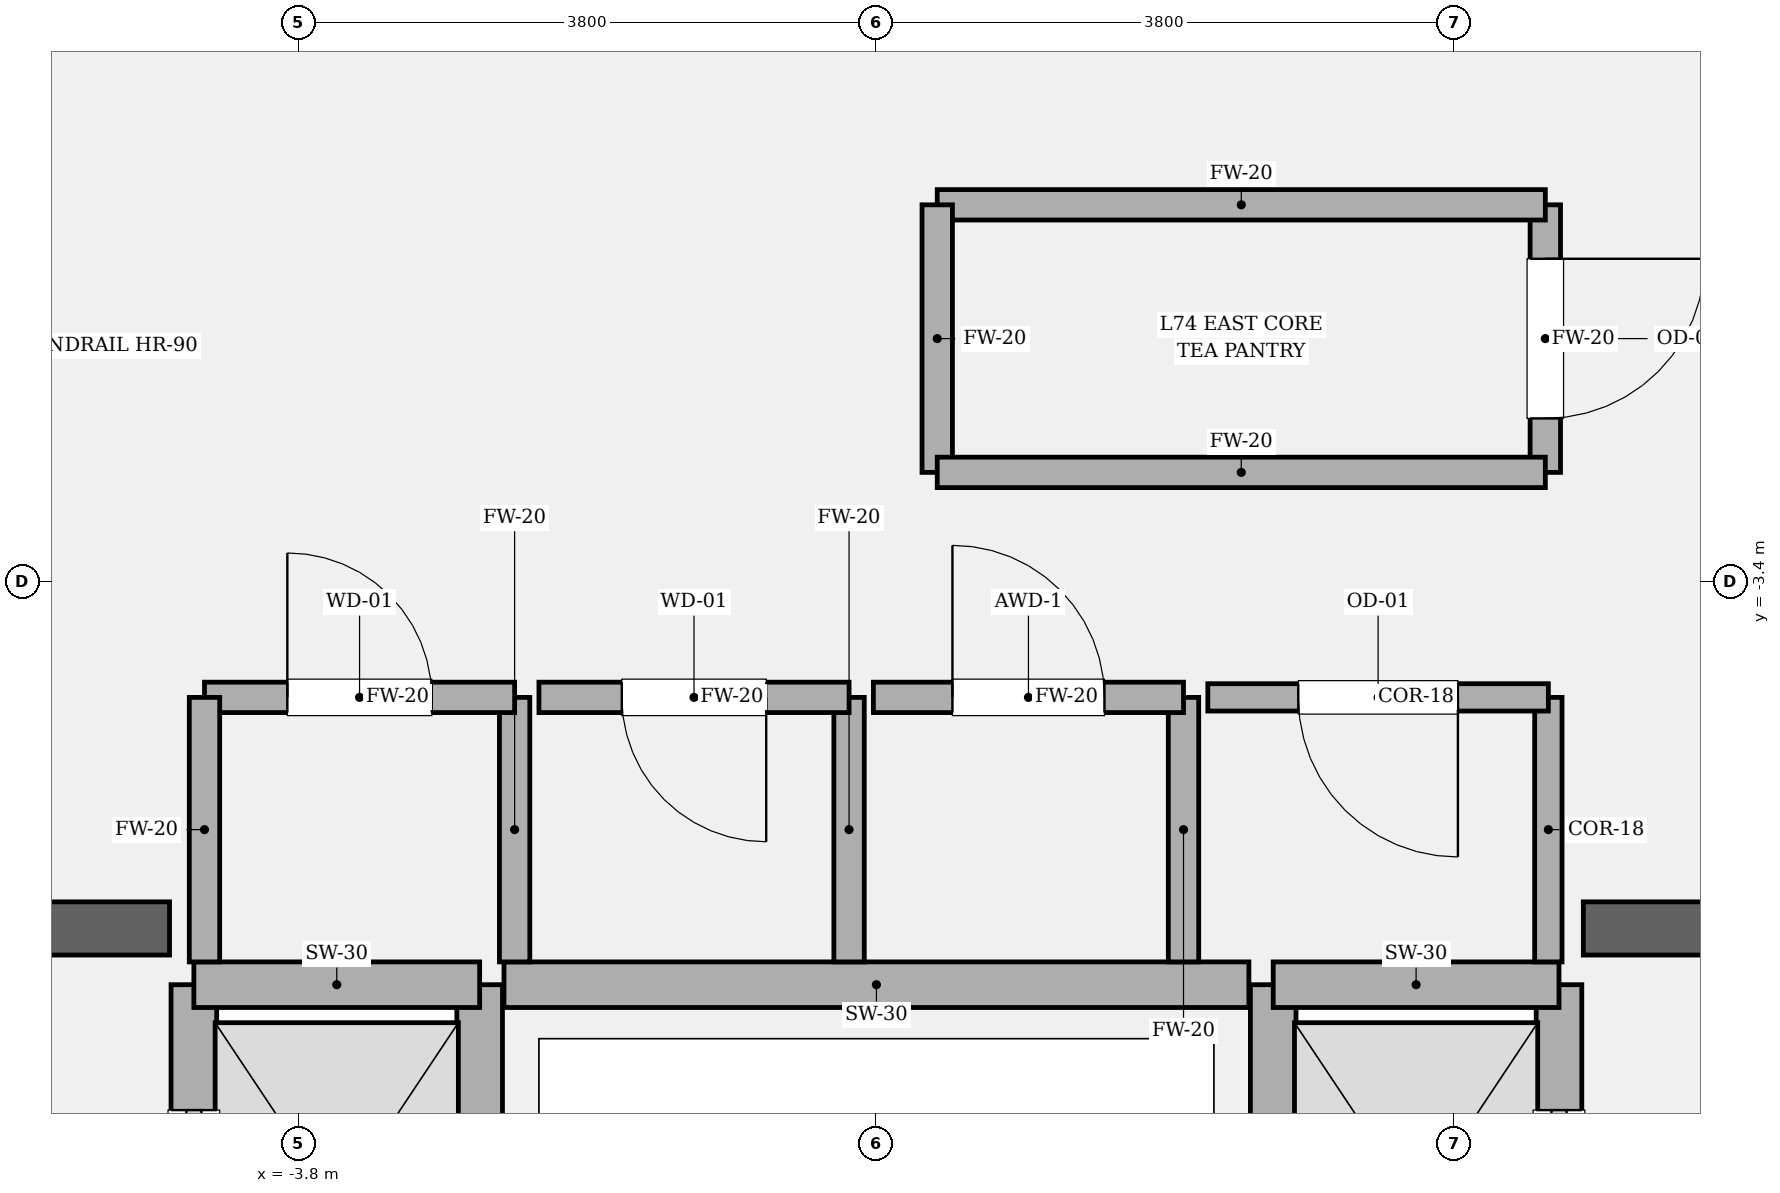
"""IFC4 building model, lengths in metres.
Left out: names, types, materials, properties, quantities, classifications, styles, units other than length and angle.
Written with IfcOpenShell. Run it as: python <this file> out.ifc"""

import sys

from ifc_helpers import new_model, si_unit, direction, frame, frame_2d, origin, place, context, subcontext, project, spatial, rectangle, extrude, element, fill, save


model = new_model("IFC4")
c1 = context("Model", 3, precision=1e-05, world=origin(), true_north=direction((0.0, 1.0)))
c2 = subcontext(c1, "Body", "Model", "MODEL_VIEW")
j1 = project(units=[si_unit("LENGTHUNIT", "METRE"), si_unit("PLANEANGLEUNIT", "RADIAN")], contexts=[c1])
p1 = place(None, origin())
s1 = spatial("IfcSite", under=j1, at=p1, CompositionType="ELEMENT")
p2 = place(p1, origin())
s2 = spatial("IfcBuilding", under=s1, at=p2, CompositionType="ELEMENT")
p3 = place(p2, frame((0.0, 0.0, 313.2)))
s3 = spatial("IfcBuildingStorey", under=s2, at=p3, CompositionType="ELEMENT", Elevation=313.2)
p4 = place(p3, frame((-9.925, -5.68, 0.0), z_axis=(0.0, 0.0, 1.0), x_axis=(1.0, 0.0, 0.0)))
e1 = element("IfcWall", 1, at=p4, inside=s3, PredefinedType="SOLIDWALL", context=c2, shape_type="SweptSolid", body=[
    extrude(rectangle(XDim=5.275, YDim=0.35, at=frame_2d((2.638, 0.0))), origin(), (0.0, 0.0, 1.0), 4.2),
])
p5 = place(p4, frame((1.385, 0.0, 0.0)))
e2 = element("IfcOpeningElement", 2, at=p5, cuts=e1, PredefinedType="OPENING", context=c2, shape_type="SweptSolid", body=[
    extrude(rectangle(XDim=1.18, YDim=2.2, at=frame_2d((0.59, 1.1))), frame((0.0, 0.185, 0.0), z_axis=(0.0, -1.0, 0.0), x_axis=(1.0, 0.0, 0.0)), (0.0, 0.0, 1.0), 0.37),
])
p6 = place(p3, frame((4.65, -5.68, 0.0), z_axis=(0.0, 0.0, 1.0), x_axis=(1.0, 0.0, 0.0)))
e3 = element("IfcWall", 3, at=p6, inside=s3, PredefinedType="SOLIDWALL", context=c2, shape_type="SweptSolid", body=[
    extrude(rectangle(XDim=5.275, YDim=0.35, at=frame_2d((2.638, 0.0))), origin(), (0.0, 0.0, 1.0), 4.2),
])
p7 = place(p6, frame((2.71, 0.0, 0.0)))
e4 = element("IfcOpeningElement", 4, at=p7, cuts=e3, PredefinedType="OPENING", context=c2, shape_type="SweptSolid", body=[
    extrude(rectangle(XDim=1.18, YDim=2.2, at=frame_2d((0.59, 1.1))), frame((0.0, 0.185, 0.0), z_axis=(0.0, -1.0, 0.0), x_axis=(1.0, 0.0, 0.0)), (0.0, 0.0, 1.0), 0.37),
])
p8 = place(p3, frame((-4.49, -8.82, 0.0), z_axis=(0.0, 0.0, 1.0), x_axis=(0.0, 1.0, 0.0)))
e5 = element("IfcWall", 5, at=p8, inside=s3, PredefinedType="SOLIDWALL", context=c2, shape_type="SweptSolid", body=[
    extrude(rectangle(XDim=2.77, YDim=0.3, at=frame_2d((1.385, 0.0))), origin(), (0.0, 0.0, 1.0), 3.92),
])
p9 = place(p8, frame((0.825, 0.0, 0.0)))
e6 = element("IfcOpeningElement", 6, at=p9, cuts=e5, PredefinedType="OPENING", context=c2, shape_type="SweptSolid", body=[
    extrude(rectangle(XDim=1.12, YDim=2.25, at=frame_2d((0.56, 1.125))), frame((0.0, 0.16, 0.0), z_axis=(0.0, -1.0, 0.0), x_axis=(1.0, 0.0, 0.0)), (0.0, 0.0, 1.0), 0.32),
])
p10 = place(p3, frame((-2.61, -8.82, 0.0), z_axis=(0.0, 0.0, 1.0), x_axis=(0.0, 1.0, 0.0)))
e7 = element("IfcWall", 7, at=p10, inside=s3, PredefinedType="SOLIDWALL", context=c2, shape_type="SweptSolid", body=[
    extrude(rectangle(XDim=2.77, YDim=0.3, at=frame_2d((1.385, 0.0))), origin(), (0.0, 0.0, 1.0), 3.92),
])
p11 = place(p3, frame((-4.49, -6.05, 0.0), z_axis=(0.0, 0.0, 1.0), x_axis=(1.0, 0.0, 0.0)))
e8 = element("IfcWall", 8, at=p11, inside=s3, PredefinedType="SOLIDWALL", context=c2, shape_type="SweptSolid", body=[
    extrude(rectangle(XDim=1.88, YDim=0.3, at=frame_2d((0.94, 0.0))), origin(), (0.0, 0.0, 1.0), 3.92),
])
p12 = place(p3, frame((4.49, -8.82, 0.0), z_axis=(0.0, 0.0, 1.0), x_axis=(0.0, 1.0, 0.0)))
e9 = element("IfcWall", 9, at=p12, inside=s3, PredefinedType="SOLIDWALL", context=c2, shape_type="SweptSolid", body=[
    extrude(rectangle(XDim=2.77, YDim=0.3, at=frame_2d((1.385, 0.0))), origin(), (0.0, 0.0, 1.0), 3.92),
])
p13 = place(p12, frame((0.825, 0.0, 0.0)))
e10 = element("IfcOpeningElement", 10, at=p13, cuts=e9, PredefinedType="OPENING", context=c2, shape_type="SweptSolid", body=[
    extrude(rectangle(XDim=1.12, YDim=2.25, at=frame_2d((0.56, 1.125))), frame((0.0, 0.16, 0.0), z_axis=(0.0, -1.0, 0.0), x_axis=(1.0, 0.0, 0.0)), (0.0, 0.0, 1.0), 0.32),
])
p14 = place(p3, frame((2.61, -8.82, 0.0), z_axis=(0.0, 0.0, 1.0), x_axis=(0.0, 1.0, 0.0)))
e11 = element("IfcWall", 11, at=p14, inside=s3, PredefinedType="SOLIDWALL", context=c2, shape_type="SweptSolid", body=[
    extrude(rectangle(XDim=2.77, YDim=0.3, at=frame_2d((1.385, 0.0))), origin(), (0.0, 0.0, 1.0), 3.92),
])
p15 = place(p3, frame((2.61, -6.05, 0.0), z_axis=(0.0, 0.0, 1.0), x_axis=(1.0, 0.0, 0.0)))
e12 = element("IfcWall", 12, at=p15, inside=s3, PredefinedType="SOLIDWALL", context=c2, shape_type="SweptSolid", body=[
    extrude(rectangle(XDim=1.88, YDim=0.3, at=frame_2d((0.94, 0.0))), origin(), (0.0, 0.0, 1.0), 3.92),
])
p16 = place(p3, frame((-2.45, -6.05, 0.0), z_axis=(0.0, 0.0, 1.0), x_axis=(1.0, 0.0, 0.0)))
e13 = element("IfcWall", 13, at=p16, inside=s3, PredefinedType="SOLIDWALL", context=c2, shape_type="SweptSolid", body=[
    extrude(rectangle(XDim=4.9, YDim=0.3, at=frame_2d((2.45, 0.0))), origin(), (0.0, 0.0, 1.0), 3.92),
])
p17 = place(p3, frame((-2.38, -5.9, 0.0), z_axis=(0.0, 0.0, 1.0), x_axis=(0.0, 1.0, 0.0)))
e14 = element("IfcWall", 14, at=p17, inside=s3, PredefinedType="SOLIDWALL", context=c2, shape_type="SweptSolid", body=[
    extrude(rectangle(XDim=1.74, YDim=0.2, at=frame_2d((0.87, 0.0))), origin(), (0.0, 0.0, 1.0), 3.92),
])
p18 = place(p3, frame((-2.38, -4.16, 0.0), z_axis=(0.0, 0.0, 1.0), x_axis=(-1.0, 0.0, 0.0)))
e15 = element("IfcWall", 15, at=p18, inside=s3, PredefinedType="SOLIDWALL", context=c2, shape_type="SweptSolid", body=[
    extrude(rectangle(XDim=2.04, YDim=0.2, at=frame_2d((1.02, 0.0))), origin(), (0.0, 0.0, 1.0), 3.92),
])
p19 = place(p18, frame((0.545, 0.0, 0.0)))
e16 = element("IfcOpeningElement", 16, at=p19, cuts=e15, PredefinedType="OPENING", context=c2, shape_type="SweptSolid", body=[
    extrude(rectangle(XDim=0.95, YDim=2.15, at=frame_2d((0.475, 1.075))), frame((0.0, 0.11, 0.0), z_axis=(0.0, -1.0, 0.0), x_axis=(1.0, 0.0, 0.0)), (0.0, 0.0, 1.0), 0.22),
])
for number, where, z_axis, x_axis in (
    (17, (-4.42, -4.16, 0.0), (0.0, 0.0, 1.0), (0.0, -1.0, 0.0)),
    (18, (-0.18, -5.9, 0.0), (0.0, 0.0, 1.0), (0.0, 1.0, 0.0)),
):
    element("IfcWall", number, at=place(p3, frame(where, z_axis=z_axis, x_axis=x_axis)), inside=s3, PredefinedType="SOLIDWALL", context=c2, shape_type="SweptSolid", body=[
        extrude(rectangle(XDim=1.74, YDim=0.2, at=frame_2d((0.87, 0.0))), origin(), (0.0, 0.0, 1.0), 3.92),
    ])
p20 = place(p3, frame((-0.18, -4.16, 0.0), z_axis=(0.0, 0.0, 1.0), x_axis=(-1.0, 0.0, 0.0)))
e19 = element("IfcWall", 19, at=p20, inside=s3, PredefinedType="SOLIDWALL", context=c2, shape_type="SweptSolid", body=[
    extrude(rectangle(XDim=2.04, YDim=0.2, at=frame_2d((1.02, 0.0))), origin(), (0.0, 0.0, 1.0), 3.92),
])
p21 = place(p20, frame((0.545, 0.0, 0.0)))
e20 = element("IfcOpeningElement", 20, at=p21, cuts=e19, PredefinedType="OPENING", context=c2, shape_type="SweptSolid", body=[
    extrude(rectangle(XDim=0.95, YDim=2.15, at=frame_2d((0.475, 1.075))), frame((0.0, 0.11, 0.0), z_axis=(0.0, -1.0, 0.0), x_axis=(1.0, 0.0, 0.0)), (0.0, 0.0, 1.0), 0.22),
])
p22 = place(p3, frame((2.02, -5.9, 0.0), z_axis=(0.0, 0.0, 1.0), x_axis=(0.0, 1.0, 0.0)))
e21 = element("IfcWall", 21, at=p22, inside=s3, PredefinedType="SOLIDWALL", context=c2, shape_type="SweptSolid", body=[
    extrude(rectangle(XDim=1.74, YDim=0.2, at=frame_2d((0.87, 0.0))), origin(), (0.0, 0.0, 1.0), 3.92),
])
p23 = place(p3, frame((2.02, -4.16, 0.0), z_axis=(0.0, 0.0, 1.0), x_axis=(-1.0, 0.0, 0.0)))
e22 = element("IfcWall", 22, at=p23, inside=s3, PredefinedType="SOLIDWALL", context=c2, shape_type="SweptSolid", body=[
    extrude(rectangle(XDim=2.04, YDim=0.2, at=frame_2d((1.02, 0.0))), origin(), (0.0, 0.0, 1.0), 3.92),
])
p24 = place(p23, frame((0.52, 0.0, 0.0)))
e23 = element("IfcOpeningElement", 23, at=p24, cuts=e22, PredefinedType="OPENING", context=c2, shape_type="SweptSolid", body=[
    extrude(rectangle(XDim=1.0, YDim=2.15, at=frame_2d((0.5, 1.075))), frame((0.0, 0.11, 0.0), z_axis=(0.0, -1.0, 0.0), x_axis=(1.0, 0.0, 0.0)), (0.0, 0.0, 1.0), 0.22),
])
p25 = place(p3, frame((4.42, -5.9, 0.0), z_axis=(0.0, 0.0, 1.0), x_axis=(0.0, 1.0, 0.0)))
e24 = element("IfcWall", 24, at=p25, inside=s3, PredefinedType="PARTITIONING", context=c2, shape_type="SweptSolid", body=[
    extrude(rectangle(XDim=1.74, YDim=0.18, at=frame_2d((0.87, 0.0))), origin(), (0.0, 0.0, 1.0), 3.92),
])
p26 = place(p3, frame((4.42, -4.16, 0.0), z_axis=(0.0, 0.0, 1.0), x_axis=(-1.0, 0.0, 0.0)))
e25 = element("IfcWall", 25, at=p26, inside=s3, PredefinedType="PARTITIONING", context=c2, shape_type="SweptSolid", body=[
    extrude(rectangle(XDim=2.24, YDim=0.18, at=frame_2d((1.12, 0.0))), origin(), (0.0, 0.0, 1.0), 3.92),
])
p27 = place(p26, frame((0.595, 0.0, 0.0)))
e26 = element("IfcOpeningElement", 26, at=p27, cuts=e25, PredefinedType="OPENING", context=c2, shape_type="SweptSolid", body=[
    extrude(rectangle(XDim=1.05, YDim=2.2, at=frame_2d((0.525, 1.1))), frame((0.0, 0.1, 0.0), z_axis=(0.0, -1.0, 0.0), x_axis=(1.0, 0.0, 0.0)), (0.0, 0.0, 1.0), 0.2),
])
p28 = place(p3, frame((4.4, -2.68, 0.0), z_axis=(0.0, 0.0, 1.0), x_axis=(0.0, 1.0, 0.0)))
e27 = element("IfcWall", 27, at=p28, inside=s3, PredefinedType="SOLIDWALL", context=c2, shape_type="SweptSolid", body=[
    extrude(rectangle(XDim=1.76, YDim=0.2, at=frame_2d((0.88, 0.0))), origin(), (0.0, 0.0, 1.0), 3.92),
])
p29 = place(p28, frame((0.355, 0.0, 0.0)))
e28 = element("IfcOpeningElement", 28, at=p29, cuts=e27, PredefinedType="OPENING", context=c2, shape_type="SweptSolid", body=[
    extrude(rectangle(XDim=1.05, YDim=2.2, at=frame_2d((0.525, 1.1))), frame((0.0, 0.11, 0.0), z_axis=(0.0, -1.0, 0.0), x_axis=(1.0, 0.0, 0.0)), (0.0, 0.0, 1.0), 0.22),
])
p30 = place(p3, frame((4.4, -0.92, 0.0), z_axis=(0.0, 0.0, 1.0), x_axis=(-1.0, 0.0, 0.0)))
e29 = element("IfcWall", 29, at=p30, inside=s3, PredefinedType="SOLIDWALL", context=c2, shape_type="SweptSolid", body=[
    extrude(rectangle(XDim=4.0, YDim=0.2, at=frame_2d((2.0, 0.0))), origin(), (0.0, 0.0, 1.0), 3.92),
])
p31 = place(p3, frame((0.4, -0.92, 0.0), z_axis=(0.0, 0.0, 1.0), x_axis=(0.0, -1.0, 0.0)))
e30 = element("IfcWall", 30, at=p31, inside=s3, PredefinedType="SOLIDWALL", context=c2, shape_type="SweptSolid", body=[
    extrude(rectangle(XDim=1.76, YDim=0.2, at=frame_2d((0.88, 0.0))), origin(), (0.0, 0.0, 1.0), 3.92),
])
p32 = place(p3, frame((0.4, -2.68, 0.0), z_axis=(0.0, 0.0, 1.0), x_axis=(1.0, 0.0, 0.0)))
e31 = element("IfcWall", 31, at=p32, inside=s3, PredefinedType="SOLIDWALL", context=c2, shape_type="SweptSolid", body=[
    extrude(rectangle(XDim=4.0, YDim=0.2, at=frame_2d((2.0, 0.0))), origin(), (0.0, 0.0, 1.0), 3.92),
])
p33 = place(p9, origin())
e32 = element("IfcDoor", 32, at=p33, inside=s3, OperationType="SLIDING_TO_LEFT", PredefinedType="DOOR", context=c2, shape_type="SweptSolid", body=[
    extrude(rectangle(XDim=1.12, YDim=2.25, at=frame_2d((0.56, 1.125))), frame((0.0, 0.025, 0.0), z_axis=(0.0, -1.0, 0.0), x_axis=(1.0, 0.0, 0.0)), (0.0, 0.0, 1.0), 0.05),
])
fill(e6, e32)
p34 = place(p13, origin())
e33 = element("IfcDoor", 33, at=p34, inside=s3, OperationType="SLIDING_TO_RIGHT", PredefinedType="DOOR", context=c2, shape_type="SweptSolid", body=[
    extrude(rectangle(XDim=1.12, YDim=2.25, at=frame_2d((0.56, 1.125))), frame((0.0, 0.025, 0.0), z_axis=(0.0, -1.0, 0.0), x_axis=(1.0, 0.0, 0.0)), (0.0, 0.0, 1.0), 0.05),
])
fill(e10, e33)
p35 = place(p19, origin())
e34 = element("IfcDoor", 34, at=p35, inside=s3, OperationType="SINGLE_SWING_RIGHT", PredefinedType="DOOR", context=c2, shape_type="SweptSolid", body=[
    extrude(rectangle(XDim=0.95, YDim=2.15, at=frame_2d((0.475, 1.075))), frame((0.0, 0.025, 0.0), z_axis=(0.0, -1.0, 0.0), x_axis=(1.0, 0.0, 0.0)), (0.0, 0.0, 1.0), 0.05),
])
fill(e16, e34)
p36 = place(p21, origin())
e35 = element("IfcDoor", 35, at=p36, inside=s3, OperationType="SINGLE_SWING_LEFT", PredefinedType="DOOR", context=c2, shape_type="SweptSolid", body=[
    extrude(rectangle(XDim=0.95, YDim=2.15, at=frame_2d((0.475, 1.075))), frame((0.0, 0.025, 0.0), z_axis=(0.0, -1.0, 0.0), x_axis=(1.0, 0.0, 0.0)), (0.0, 0.0, 1.0), 0.05),
])
fill(e20, e35)
p37 = place(p24, origin())
e36 = element("IfcDoor", 36, at=p37, inside=s3, OperationType="SINGLE_SWING_RIGHT", PredefinedType="DOOR", context=c2, shape_type="SweptSolid", body=[
    extrude(rectangle(XDim=1.0, YDim=2.15, at=frame_2d((0.5, 1.075))), frame((0.0, 0.025, 0.0), z_axis=(0.0, -1.0, 0.0), x_axis=(1.0, 0.0, 0.0)), (0.0, 0.0, 1.0), 0.05),
])
fill(e23, e36)
p38 = place(p27, origin())
e37 = element("IfcDoor", 37, at=p38, inside=s3, OperationType="SINGLE_SWING_LEFT", PredefinedType="DOOR", context=c2, shape_type="SweptSolid", body=[
    extrude(rectangle(XDim=1.05, YDim=2.2, at=frame_2d((0.525, 1.1))), frame((0.0, 0.025, 0.0), z_axis=(0.0, -1.0, 0.0), x_axis=(1.0, 0.0, 0.0)), (0.0, 0.0, 1.0), 0.05),
])
fill(e26, e37)
p39 = place(p29, origin())
e38 = element("IfcDoor", 38, at=p39, inside=s3, OperationType="SINGLE_SWING_RIGHT", PredefinedType="DOOR", context=c2, shape_type="SweptSolid", body=[
    extrude(rectangle(XDim=1.05, YDim=2.2, at=frame_2d((0.525, 1.1))), frame((0.0, 0.025, 0.0), z_axis=(0.0, -1.0, 0.0), x_axis=(1.0, 0.0, 0.0)), (0.0, 0.0, 1.0), 0.05),
])
fill(e28, e38)
save(model, sys.argv[1])
